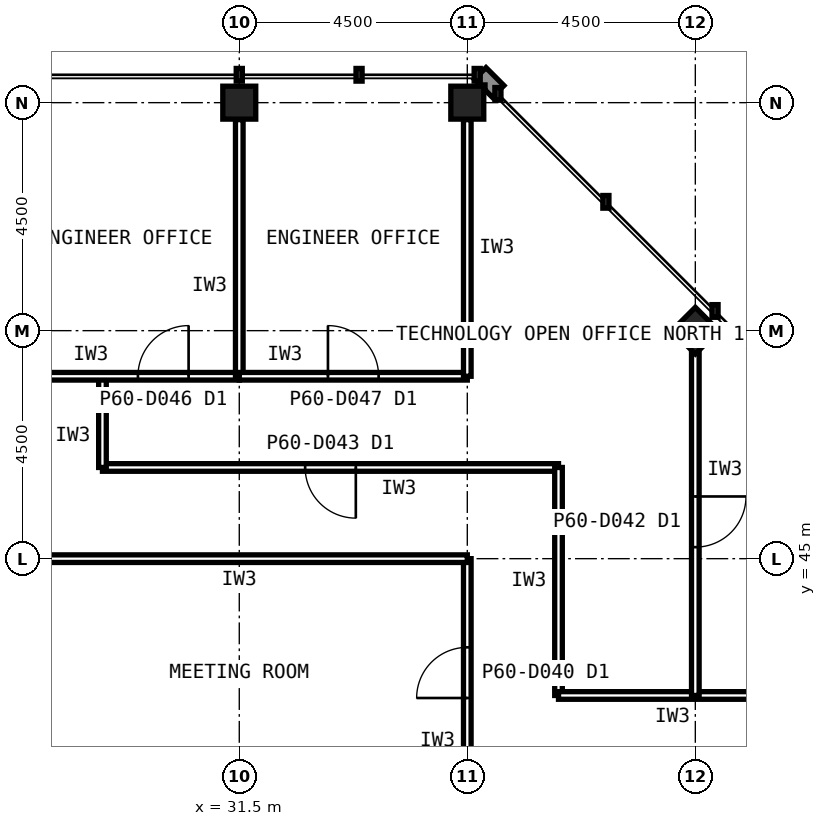
"""IFC4 building model, lengths in metres.
Left out: names, types, materials, properties, quantities, classifications, styles, units other than length and angle.
Written with IfcOpenShell. Run it as: python <this file> out.ifc"""

import sys

from ifc_helpers import new_model, si_unit, direction, frame, frame_2d, origin, origin_2d, place, context, subcontext, project, spatial, rectangle, hollow_rectangle, extrude, element, fill, save


model = new_model("IFC4")
c1 = context("Model", 3, precision=1e-05, world=origin(), true_north=direction((0.0, 1.0)))
c2 = subcontext(c1, "Body", "Model", "MODEL_VIEW")
j1 = project(units=[si_unit("LENGTHUNIT", "METRE"), si_unit("PLANEANGLEUNIT", "RADIAN")], contexts=[c1])
p1 = place(None, origin())
s1 = spatial("IfcSite", under=j1, at=p1, CompositionType="ELEMENT")
p2 = place(p1, origin())
s2 = spatial("IfcBuilding", under=s1, at=p2, CompositionType="ELEMENT")
p3 = place(p2, frame((0.0, 0.0, 254.6)))
s3 = spatial("IfcBuildingStorey", under=s2, at=p3, CompositionType="ELEMENT", Elevation=254.6)
for number, where, z_axis, x_axis in (
    (1, (36.0, 54.0, 0.0), (0.0, 0.0, 1.0), (1.0, 0.0, 0.0)),
    (2, (31.5, 54.0, 0.0), (0.0, 0.0, 1.0), (1.0, 0.0, 0.0)),
    (3, (40.5, 49.5, 0.0), (0.0, 0.0, 1.0), (0.707, 0.707, 0.0)),
):
    element("IfcColumn", number, at=place(p3, frame(where, z_axis=z_axis, x_axis=x_axis)), inside=s3, PredefinedType="COLUMN", context=c2, shape_type="SweptSolid", body=[
        extrude(hollow_rectangle(XDim=0.65, YDim=0.65, WallThickness=0.032, at=origin_2d()), origin(), (0.0, 0.0, 1.0), 4.0),
    ])
p4 = place(p3, frame((37.8, 46.8, 0.0), z_axis=(0.0, 0.0, 1.0), x_axis=(-1.0, 0.0, 0.0)))
e4 = element("IfcWall", 4, at=p4, inside=s3, PredefinedType="PARTITIONING", context=c2, shape_type="SweptSolid", body=[
    extrude(rectangle(XDim=9.0, YDim=0.15, at=frame_2d((4.5, 0.0))), origin(), (0.0, 0.0, 1.0), 3.84),
])
p5 = place(p4, frame((4.0, 0.0, 0.0)))
e5 = element("IfcOpeningElement", 5, at=p5, cuts=e4, PredefinedType="OPENING", context=c2, shape_type="SweptSolid", body=[
    extrude(rectangle(XDim=1.0, YDim=2.1, at=frame_2d((0.5, 1.05))), frame((0.0, 0.085, 0.0), z_axis=(0.0, -1.0, 0.0), x_axis=(1.0, 0.0, 0.0)), (0.0, 0.0, 1.0), 0.17),
])
for number, where, z_axis, x_axis in (
    (6, (37.8, 42.3, 0.0), (0.0, 0.0, 1.0), (0.0, 1.0, 0.0)),
    (7, (42.3, 42.3, 0.0), (0.0, 0.0, 1.0), (-1.0, 0.0, 0.0)),
):
    element("IfcWall", number, at=place(p3, frame(where, z_axis=z_axis, x_axis=x_axis)), inside=s3, PredefinedType="PARTITIONING", context=c2, shape_type="SweptSolid", body=[
        extrude(rectangle(XDim=4.5, YDim=0.15, at=frame_2d((2.25, 0.0))), origin(), (0.0, 0.0, 1.0), 3.84),
    ])
p6 = place(p3, frame((28.8, 46.8, 0.0), z_axis=(0.0, 0.0, 1.0), x_axis=(0.0, 1.0, 0.0)))
e8 = element("IfcWall", 8, at=p6, inside=s3, PredefinedType="PARTITIONING", context=c2, shape_type="SweptSolid", body=[
    extrude(rectangle(XDim=1.8, YDim=0.15, at=frame_2d((0.9, 0.0))), origin(), (0.0, 0.0, 1.0), 3.84),
])
p7 = place(p3, frame((36.0, 40.5, 0.0), z_axis=(0.0, 0.0, 1.0), x_axis=(0.0, 1.0, 0.0)))
e9 = element("IfcWall", 9, at=p7, inside=s3, PredefinedType="PARTITIONING", context=c2, shape_type="SweptSolid", body=[
    extrude(rectangle(XDim=4.5, YDim=0.15, at=frame_2d((2.25, 0.0))), origin(), (0.0, 0.0, 1.0), 2.989),
])
p8 = place(p7, frame((1.75, 0.0, 0.0)))
e10 = element("IfcOpeningElement", 10, at=p8, cuts=e9, PredefinedType="OPENING", context=c2, shape_type="SweptSolid", body=[
    extrude(rectangle(XDim=1.0, YDim=2.1, at=frame_2d((0.5, 1.05))), frame((0.0, 0.085, 0.0), z_axis=(0.0, -1.0, 0.0), x_axis=(1.0, 0.0, 0.0)), (0.0, 0.0, 1.0), 0.17),
])
p9 = place(p3, frame((36.0, 45.0, 0.0), z_axis=(0.0, 0.0, 1.0), x_axis=(-1.0, 0.0, 0.0)))
e11 = element("IfcWall", 11, at=p9, inside=s3, PredefinedType="PARTITIONING", context=c2, shape_type="SweptSolid", body=[
    extrude(rectangle(XDim=9.0, YDim=0.15, at=frame_2d((4.5, 0.0))), origin(), (0.0, 0.0, 1.0), 3.84),
])
p10 = place(p3, frame((27.0, 48.6, 0.0), z_axis=(0.0, 0.0, 1.0), x_axis=(1.0, 0.0, 0.0)))
e12 = element("IfcWall", 12, at=p10, inside=s3, PredefinedType="PARTITIONING", context=c2, shape_type="SweptSolid", body=[
    extrude(rectangle(XDim=4.5, YDim=0.15, at=frame_2d((2.25, 0.0))), origin(), (0.0, 0.0, 1.0), 3.84),
])
p11 = place(p10, frame((2.5, 0.0, 0.0)))
e13 = element("IfcOpeningElement", 13, at=p11, cuts=e12, PredefinedType="OPENING", context=c2, shape_type="SweptSolid", body=[
    extrude(rectangle(XDim=1.0, YDim=2.1, at=frame_2d((0.5, 1.05))), frame((0.0, 0.085, 0.0), z_axis=(0.0, -1.0, 0.0), x_axis=(1.0, 0.0, 0.0)), (0.0, 0.0, 1.0), 0.17),
])
p12 = place(p3, frame((31.5, 48.6, 0.0), z_axis=(0.0, 0.0, 1.0), x_axis=(0.0, 1.0, 0.0)))
e14 = element("IfcWall", 14, at=p12, inside=s3, PredefinedType="PARTITIONING", context=c2, shape_type="SweptSolid", body=[
    extrude(rectangle(XDim=5.065, YDim=0.15, at=frame_2d((2.532, 0.0))), origin(), (0.0, 0.0, 1.0), 2.989),
])
p13 = place(p3, frame((31.5, 48.6, 0.0), z_axis=(0.0, 0.0, 1.0), x_axis=(1.0, 0.0, 0.0)))
e15 = element("IfcWall", 15, at=p13, inside=s3, PredefinedType="PARTITIONING", context=c2, shape_type="SweptSolid", body=[
    extrude(rectangle(XDim=4.5, YDim=0.15, at=frame_2d((2.25, 0.0))), origin(), (0.0, 0.0, 1.0), 3.84),
])
p14 = place(p13, frame((1.75, 0.0, 0.0)))
e16 = element("IfcOpeningElement", 16, at=p14, cuts=e15, PredefinedType="OPENING", context=c2, shape_type="SweptSolid", body=[
    extrude(rectangle(XDim=1.0, YDim=2.1, at=frame_2d((0.5, 1.05))), frame((0.0, 0.085, 0.0), z_axis=(0.0, -1.0, 0.0), x_axis=(1.0, 0.0, 0.0)), (0.0, 0.0, 1.0), 0.17),
])
p15 = place(p3, frame((36.0, 48.6, 0.0), z_axis=(0.0, 0.0, 1.0), x_axis=(0.0, 1.0, 0.0)))
e17 = element("IfcWall", 17, at=p15, inside=s3, PredefinedType="PARTITIONING", context=c2, shape_type="SweptSolid", body=[
    extrude(rectangle(XDim=5.065, YDim=0.15, at=frame_2d((2.532, 0.0))), origin(), (0.0, 0.0, 1.0), 2.989),
])
p16 = place(p3, frame((40.5, 49.155, 0.0), z_axis=(0.0, 0.0, 1.0), x_axis=(0.0, -1.0, 0.0)))
e18 = element("IfcWall", 18, at=p16, inside=s3, PredefinedType="PARTITIONING", context=c2, shape_type="SweptSolid", body=[
    extrude(rectangle(XDim=6.855, YDim=0.15, at=frame_2d((3.427, 0.0))), origin(), (0.0, 0.0, 1.0), 2.989),
])
p17 = place(p16, frame((2.927, 0.0, 0.0)))
e19 = element("IfcOpeningElement", 19, at=p17, cuts=e18, PredefinedType="OPENING", context=c2, shape_type="SweptSolid", body=[
    extrude(rectangle(XDim=1.0, YDim=2.1, at=frame_2d((0.5, 1.05))), frame((0.0, 0.085, 0.0), z_axis=(0.0, -1.0, 0.0), x_axis=(1.0, 0.0, 0.0)), (0.0, 0.0, 1.0), 0.17),
])
p18 = place(p5, origin())
e20 = element("IfcDoor", 20, at=p18, inside=s3, OperationType="SINGLE_SWING_LEFT", PredefinedType="DOOR", context=c2, shape_type="SweptSolid", body=[
    extrude(rectangle(XDim=1.0, YDim=2.1, at=frame_2d((0.5, 1.05))), frame((0.0, 0.025, 0.0), z_axis=(0.0, -1.0, 0.0), x_axis=(1.0, 0.0, 0.0)), (0.0, 0.0, 1.0), 0.05),
])
fill(e5, e20)
p19 = place(p8, origin())
e21 = element("IfcDoor", 21, at=p19, inside=s3, OperationType="SINGLE_SWING_LEFT", PredefinedType="DOOR", context=c2, shape_type="SweptSolid", body=[
    extrude(rectangle(XDim=1.0, YDim=2.1, at=frame_2d((0.5, 1.05))), frame((0.0, 0.025, 0.0), z_axis=(0.0, -1.0, 0.0), x_axis=(1.0, 0.0, 0.0)), (0.0, 0.0, 1.0), 0.05),
])
fill(e10, e21)
p20 = place(p11, origin())
e22 = element("IfcDoor", 22, at=p20, inside=s3, OperationType="SINGLE_SWING_RIGHT", PredefinedType="DOOR", context=c2, shape_type="SweptSolid", body=[
    extrude(rectangle(XDim=1.0, YDim=2.1, at=frame_2d((0.5, 1.05))), frame((0.0, 0.025, 0.0), z_axis=(0.0, -1.0, 0.0), x_axis=(1.0, 0.0, 0.0)), (0.0, 0.0, 1.0), 0.05),
])
fill(e13, e22)
p21 = place(p14, origin())
e23 = element("IfcDoor", 23, at=p21, inside=s3, OperationType="SINGLE_SWING_LEFT", PredefinedType="DOOR", context=c2, shape_type="SweptSolid", body=[
    extrude(rectangle(XDim=1.0, YDim=2.1, at=frame_2d((0.5, 1.05))), frame((0.0, 0.025, 0.0), z_axis=(0.0, -1.0, 0.0), x_axis=(1.0, 0.0, 0.0)), (0.0, 0.0, 1.0), 0.05),
])
fill(e16, e23)
p22 = place(p17, origin())
e24 = element("IfcDoor", 24, at=p22, inside=s3, OperationType="SINGLE_SWING_LEFT", PredefinedType="DOOR", context=c2, shape_type="SweptSolid", body=[
    extrude(rectangle(XDim=1.0, YDim=2.1, at=frame_2d((0.5, 1.05))), frame((0.0, 0.025, 0.0), z_axis=(0.0, -1.0, 0.0), x_axis=(1.0, 0.0, 0.0)), (0.0, 0.0, 1.0), 0.05),
])
fill(e19, e24)
save(model, sys.argv[1])
